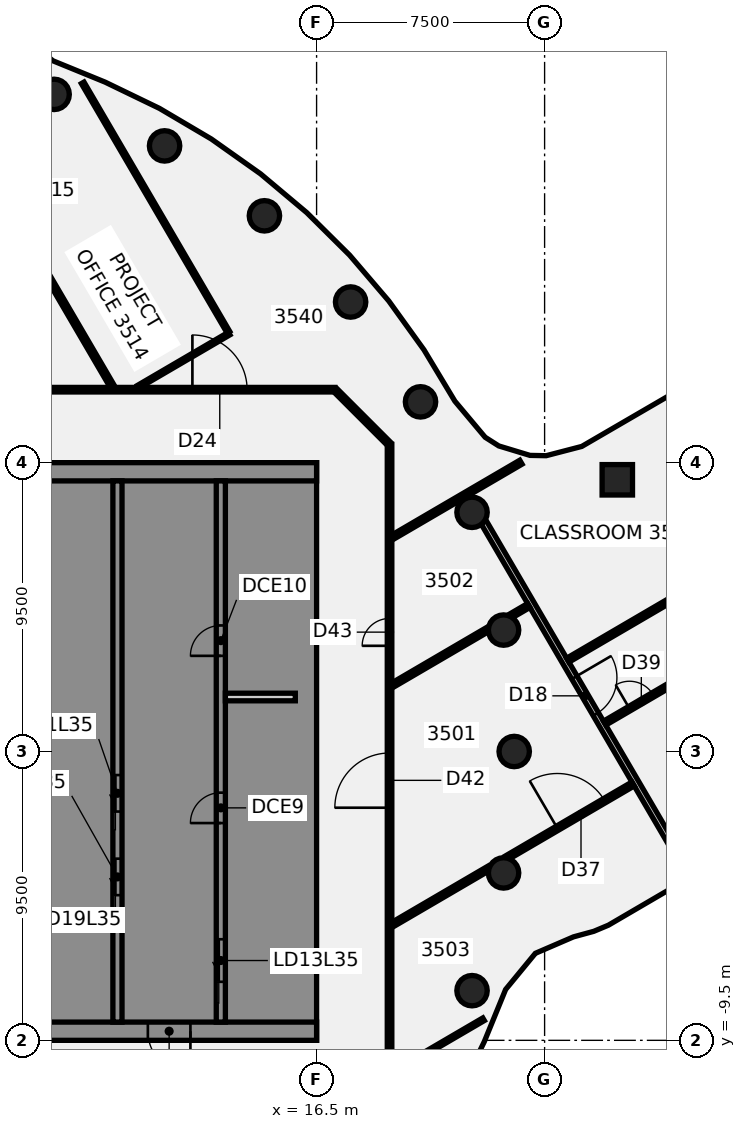
"""IFC4 building model, lengths in metres.
Left out: names, types, materials, properties, quantities, classifications, styles, units other than length and angle.
Written with IfcOpenShell. Run it as: python <this file> out.ifc"""

import sys

from ifc_helpers import new_model, si_unit, direction, frame, frame_2d, origin, origin_2d, place, context, subcontext, project, spatial, polyline, rectangle, circle, outline, extrude, element, fill, save


model = new_model("IFC4")
c1 = context("Model", 3, precision=1e-05, world=origin(), true_north=direction((0.0, 1.0)))
c2 = subcontext(c1, "Body", "Model", "MODEL_VIEW")
j1 = project(units=[si_unit("LENGTHUNIT", "METRE"), si_unit("PLANEANGLEUNIT", "RADIAN")], contexts=[c1])
p1 = place(None, origin())
s1 = spatial("IfcSite", under=j1, at=p1, CompositionType="ELEMENT")
p2 = place(p1, origin())
s2 = spatial("IfcBuilding", under=s1, at=p2, CompositionType="ELEMENT")
p3 = place(p2, frame((0.0, 0.0, 144.25)))
s3 = spatial("IfcBuildingStorey", under=s2, at=p3, CompositionType="ELEMENT", Elevation=144.25)
for number, where, z_axis, x_axis in (
    (1, (23.0, 0.0, -0.14), (0.0, 0.0, 1.0), (1.0, 0.0, 0.0)),
    (2, (22.651, 3.994, -0.14), (0.0, 0.0, 1.0), (1.0, 0.0, 0.0)),
    (3, (21.613, 7.866, -0.14), (0.0, 0.0, 1.0), (1.0, 0.0, 0.0)),
    (4, (19.919, 11.5, -0.14), (0.0, 0.0, 1.0), (1.0, 0.0, 0.0)),
    (5, (17.619, 14.784, -0.14), (0.0, 0.0, 1.0), (1.0, 0.0, 0.0)),
    (6, (14.784, 17.619, -0.14), (0.0, 0.0, 1.0), (1.0, 0.0, 0.0)),
    (7, (11.5, 19.919, -0.14), (0.0, 0.0, 1.0), (1.0, 0.0, 0.0)),
    (8, (7.866, 21.613, -0.14), (0.0, 0.0, 1.0), (1.0, 0.0, 0.0)),
    (9, (21.613, -7.866, -0.14), (0.0, 0.0, 1.0), (1.0, 0.0, 0.0)),
    (10, (22.651, -3.994, -0.14), (0.0, 0.0, 1.0), (1.0, 0.0, 0.0)),
):
    element("IfcColumn", number, at=place(p3, frame(where, z_axis=z_axis, x_axis=x_axis)), inside=s3, PredefinedType="COLUMN", context=c2, shape_type="SweptSolid", body=[
        extrude(circle(Radius=0.5, at=origin_2d()), origin(), (0.0, 0.0, 1.0), 3.75),
    ])
p4 = place(p3, frame((26.391, 8.936, -0.139), z_axis=(-0.043600009334, 0.020888959696, 0.998830661598), x_axis=(0.504374638489, -0.862555380263, 0.04005546191)))
e11 = element("IfcColumn", 11, at=p4, inside=s3, PredefinedType="COLUMN", context=c2, shape_type="SweptSolid", body=[
    extrude(rectangle(XDim=1.0, YDim=1.0, at=origin_2d()), origin(), (0.0, 0.0, 1.0), 3.752),
])
p5 = place(p3, frame((3.782, 22.267, 0.0), z_axis=(0.0, 0.0, 1.0), x_axis=(0.504584110855, -0.863362539767, 0.0)))
e12 = element("IfcWall", 12, at=p5, inside=s3, PredefinedType="PARTITIONING", context=c2, shape_type="SweptSolid", body=[
    extrude(rectangle(XDim=11.897, YDim=0.15, at=frame_2d((5.948, 0.0))), origin(), (0.0, 0.0, 1.0), 3.01),
])
p6 = place(p5, frame((3.995, 0.0, 0.0)))
e13 = element("IfcOpeningElement", 13, at=p6, cuts=e12, PredefinedType="OPENING", context=c2, shape_type="SweptSolid", body=[
    extrude(rectangle(XDim=0.9, YDim=2.1, at=frame_2d((0.45, 1.05))), frame((0.0, 0.085, 0.0), z_axis=(0.0, -1.0, 0.0), x_axis=(1.0, 0.0, 0.0)), (0.0, 0.0, 1.0), 0.17),
])
p7 = place(p3, frame((8.807, 21.993, 0.0), z_axis=(0.0, 0.0, 1.0), x_axis=(0.50451801346, -0.863401166373, 0.0)))
e14 = element("IfcWall", 14, at=p7, inside=s3, PredefinedType="PARTITIONING", context=c2, shape_type="SweptSolid", body=[
    extrude(rectangle(XDim=9.5, YDim=0.1, at=frame_2d((4.75, 0.0))), origin(), (0.0, 0.0, 1.0), 3.01),
])
p8 = place(p3, frame((21.991, 7.548, 0.0), z_axis=(0.0, 0.0, 1.0), x_axis=(0.504551750996, -0.863381451369, 0.0)))
e15 = element("IfcWall", 15, at=p8, inside=s3, PredefinedType="PARTITIONING", context=c2, shape_type="SweptSolid", body=[
    extrude(rectangle(XDim=13.22, YDim=0.2, at=frame_2d((6.61, 0.0))), origin(), (0.0, 0.0, 1.0), 3.01),
])
p9 = place(p8, frame((5.922, 0.0, 0.0)))
e16 = element("IfcOpeningElement", 16, at=p9, cuts=e15, PredefinedType="OPENING", context=c2, shape_type="SweptSolid", body=[
    extrude(rectangle(XDim=1.4, YDim=2.1, at=frame_2d((0.7, 1.05))), frame((0.0, 0.11, 0.0), z_axis=(0.0, -1.0, 0.0), x_axis=(1.0, 0.0, 0.0)), (0.0, 0.0, 1.0), 0.22),
])
p10 = place(p3, frame((17.128, 11.872, 0.0), z_axis=(0.0, 0.0, 1.0), x_axis=(0.707106781187, -0.707106781187, 0.0)))
e17 = element("IfcWall", 17, at=p10, inside=s3, PredefinedType="PARTITIONING", context=c2, shape_type="SweptSolid", body=[
    extrude(rectangle(XDim=2.465, YDim=0.15, at=frame_2d((1.232, 0.0))), origin(), (0.0, 0.0, 1.0), 3.01),
])
p11 = place(p3, frame((-17.065, 11.9, 0.0), z_axis=(0.0, 0.0, 1.0), x_axis=(1.0, 0.0, 0.0)))
e18 = element("IfcWall", 18, at=p11, inside=s3, PredefinedType="PARTITIONING", context=c2, shape_type="SweptSolid", body=[
    extrude(rectangle(XDim=34.165, YDim=0.15, at=frame_2d((17.083, 0.0))), origin(), (0.0, 0.0, 1.0), 3.01),
])
p12 = place(p11, frame((22.029, 0.0, 0.0)))
e19 = element("IfcOpeningElement", 19, at=p12, cuts=e18, PredefinedType="OPENING", context=c2, shape_type="SweptSolid", body=[
    extrude(rectangle(XDim=1.8, YDim=2.1, at=frame_2d((0.9, 1.05))), frame((0.0, 0.085, 0.0), z_axis=(0.0, -1.0, 0.0), x_axis=(1.0, 0.0, 0.0)), (0.0, 0.0, 1.0), 0.17),
])
p13 = place(p11, frame((29.48, 0.0, 0.0)))
e20 = element("IfcOpeningElement", 20, at=p13, cuts=e18, PredefinedType="OPENING", context=c2, shape_type="SweptSolid", body=[
    extrude(rectangle(XDim=1.8, YDim=2.1, at=frame_2d((0.9, 1.05))), frame((0.0, 0.085, 0.0), z_axis=(0.0, -1.0, 0.0), x_axis=(1.0, 0.0, 0.0)), (0.0, 0.0, 1.0), 0.17),
])
p14 = place(p11, frame((6.265, 0.0, 0.0)))
e21 = element("IfcOpeningElement", 21, at=p14, cuts=e18, PredefinedType="OPENING", context=c2, shape_type="SweptSolid", body=[
    extrude(rectangle(XDim=1.8, YDim=2.1, at=frame_2d((0.9, 1.05))), frame((0.0, 0.085, 0.0), z_axis=(0.0, -1.0, 0.0), x_axis=(1.0, 0.0, 0.0)), (0.0, 0.0, 1.0), 0.17),
])
p15 = place(p3, frame((10.633, 11.998, 0.0), z_axis=(0.0, 0.0, 1.0), x_axis=(0.863323711201, 0.504650542136, 0.0)))
e22 = element("IfcWall", 22, at=p15, inside=s3, PredefinedType="PARTITIONING", context=c2, shape_type="SweptSolid", body=[
    extrude(rectangle(XDim=3.465, YDim=0.1, at=frame_2d((1.733, 0.0))), origin(), (0.0, 0.0, 1.0), 3.01),
])
p16 = place(p3, frame((17.992, -11.144, 0.0), z_axis=(0.0, 0.0, 1.0), x_axis=(0.863423214725, 0.504480279371, 0.0)))
e23 = element("IfcWall", 23, at=p16, inside=s3, PredefinedType="PARTITIONING", context=c2, shape_type="SweptSolid", body=[
    extrude(rectangle(XDim=4.633, YDim=0.1, at=frame_2d((2.317, 0.0))), origin(), (0.0, 0.0, 1.0), 3.01),
])
p17 = place(p3, frame((18.995, -5.694, 0.0), z_axis=(0.0, 0.0, 1.0), x_axis=(0.863366335697, 0.504577615818, 0.0)))
e24 = element("IfcWall", 24, at=p17, inside=s3, PredefinedType="PARTITIONING", context=c2, shape_type="SweptSolid", body=[
    extrude(rectangle(XDim=3.694, YDim=0.15, at=frame_2d((1.847, 0.0))), origin(), (0.0, 0.0, 1.0), 3.01),
])
p18 = place(p3, frame((22.737, -3.507, 0.0), z_axis=(0.0, 0.0, 1.0), x_axis=(0.863390233873, 0.504536722205, 0.0)))
e25 = element("IfcWall", 25, at=p18, inside=s3, PredefinedType="PARTITIONING", context=c2, shape_type="SweptSolid", body=[
    extrude(rectangle(XDim=4.833, YDim=0.15, at=frame_2d((2.417, 0.0))), origin(), (0.0, 0.0, 1.0), 3.01),
])
p19 = place(p18, frame((1.95, 0.0, 0.0)))
e26 = element("IfcOpeningElement", 26, at=p19, cuts=e25, PredefinedType="OPENING", context=c2, shape_type="SweptSolid", body=[
    extrude(rectangle(XDim=1.8, YDim=2.1, at=frame_2d((0.9, 1.05))), frame((0.0, 0.085, 0.0), z_axis=(0.0, -1.0, 0.0), x_axis=(1.0, 0.0, 0.0)), (0.0, 0.0, 1.0), 0.17),
])
p20 = place(p3, frame((18.995, 2.181, 0.0), z_axis=(0.0, 0.0, 1.0), x_axis=(0.863310681939, 0.5046728311, 0.0)))
e27 = element("IfcWall", 27, at=p20, inside=s3, PredefinedType="PARTITIONING", context=c2, shape_type="SweptSolid", body=[
    extrude(rectangle(XDim=3.653, YDim=0.15, at=frame_2d((1.826, 0.0))), origin(), (0.0, 0.0, 1.0), 3.01),
])
p21 = place(p3, frame((22.869, 4.446, 0.0), z_axis=(0.0, 0.0, 1.0), x_axis=(0.863490976758, 0.504364286065, 0.0)))
e28 = element("IfcWall", 28, at=p21, inside=s3, PredefinedType="PARTITIONING", context=c2, shape_type="SweptSolid", body=[
    extrude(rectangle(XDim=0.708, YDim=0.15, at=frame_2d((0.354, 0.0))), origin(), (0.0, 0.0, 1.0), 3.01),
])
p22 = place(p3, frame((18.995, 7.046, 0.0), z_axis=(0.0, 0.0, 1.0), x_axis=(0.863429510598, 0.504469503765, 0.0)))
e29 = element("IfcWall", 29, at=p22, inside=s3, PredefinedType="PARTITIONING", context=c2, shape_type="SweptSolid", body=[
    extrude(rectangle(XDim=4.894, YDim=0.15, at=frame_2d((2.447, 0.0))), origin(), (0.0, 0.0, 1.0), 3.01),
])
p23 = place(p3, frame((24.762, 3.003, 0.0), z_axis=(0.0, 0.0, 1.0), x_axis=(0.863377230874, 0.504558972975, 0.0)))
e30 = element("IfcWall", 30, at=p23, inside=s3, PredefinedType="PARTITIONING", context=c2, shape_type="SweptSolid", body=[
    extrude(rectangle(XDim=13.324, YDim=0.15, at=frame_2d((6.662, 0.0))), origin(), (0.0, 0.0, 1.0), 3.01),
])
p24 = place(p23, frame((7.4, 0.0, 0.0)))
e31 = element("IfcOpeningElement", 31, at=p24, cuts=e30, PredefinedType="OPENING", context=c2, shape_type="SweptSolid", body=[
    extrude(rectangle(XDim=1.8, YDim=2.1, at=frame_2d((0.9, 1.05))), frame((0.0, 0.085, 0.0), z_axis=(0.0, -1.0, 0.0), x_axis=(1.0, 0.0, 0.0)), (0.0, 0.0, 1.0), 0.17),
])
p25 = place(p3, frame((25.977, 0.934, 0.0), z_axis=(0.0, 0.0, 1.0), x_axis=(0.863369794548, 0.504571697445, 0.0)))
e32 = element("IfcWall", 32, at=p25, inside=s3, PredefinedType="PARTITIONING", context=c2, shape_type="SweptSolid", body=[
    extrude(rectangle(XDim=3.855, YDim=0.15, at=frame_2d((1.928, 0.0))), origin(), (0.0, 0.0, 1.0), 3.01),
])
p26 = place(p25, frame((0.945, 0.0, 0.0)))
e33 = element("IfcOpeningElement", 33, at=p26, cuts=e32, PredefinedType="OPENING", context=c2, shape_type="SweptSolid", body=[
    extrude(rectangle(XDim=0.9, YDim=2.1, at=frame_2d((0.45, 1.05))), frame((0.0, 0.085, 0.0), z_axis=(0.0, -1.0, 0.0), x_axis=(1.0, 0.0, 0.0)), (0.0, 0.0, 1.0), 0.17),
])
p27 = place(p3, frame((18.9, -10.1, 0.0), z_axis=(0.0, 0.0, 1.0), x_axis=(0.0, 1.0, 0.0)))
e34 = element("IfcWall", 34, at=p27, inside=s3, PredefinedType="PARTITIONING", context=c2, shape_type="SweptSolid", body=[
    extrude(rectangle(XDim=20.2, YDim=0.15, at=frame_2d((10.1, 0.0))), origin(), (0.0, 0.0, 1.0), 3.01),
])
p28 = place(p27, frame((8.251, 0.0, 0.0)))
e35 = element("IfcOpeningElement", 35, at=p28, cuts=e34, PredefinedType="OPENING", context=c2, shape_type="SweptSolid", body=[
    extrude(rectangle(XDim=1.8, YDim=2.1, at=frame_2d((0.9, 1.05))), frame((0.0, 0.085, 0.0), z_axis=(0.0, -1.0, 0.0), x_axis=(1.0, 0.0, 0.0)), (0.0, 0.0, 1.0), 0.17),
])
p29 = place(p27, frame((13.576, 0.0, 0.0)))
e36 = element("IfcOpeningElement", 36, at=p29, cuts=e34, PredefinedType="OPENING", context=c2, shape_type="SweptSolid", body=[
    extrude(rectangle(XDim=0.9, YDim=2.1, at=frame_2d((0.45, 1.05))), frame((0.0, 0.085, 0.0), z_axis=(0.0, -1.0, 0.0), x_axis=(1.0, 0.0, 0.0)), (0.0, 0.0, 1.0), 0.17),
])
p30 = place(p3, frame((16.5, -9.2, 0.0), z_axis=(0.0, 0.0, 1.0), x_axis=(-1.0, 0.0, 0.0)))
e37 = element("IfcWall", 37, at=p30, inside=s3, PredefinedType="SHEAR", context=c2, shape_type="SweptSolid", body=[
    extrude(rectangle(XDim=13.0, YDim=0.6, at=frame_2d((6.5, 0.0))), origin(), (0.0, 0.0, 1.0), 3.61),
])
p31 = place(p30, frame((4.15, 0.0, 0.0)))
e38 = element("IfcOpeningElement", 38, at=p31, cuts=e37, PredefinedType="OPENING", context=c2, shape_type="SweptSolid", body=[
    extrude(rectangle(XDim=1.4, YDim=2.1, at=frame_2d((0.7, 1.05))), frame((0.0, 0.31, 0.0), z_axis=(0.0, -1.0, 0.0), x_axis=(1.0, 0.0, 0.0)), (0.0, 0.0, 1.0), 0.62),
])
p32 = place(p30, frame((10.125, 0.0, 0.0)))
e39 = element("IfcOpeningElement", 39, at=p32, cuts=e37, PredefinedType="OPENING", context=c2, shape_type="SweptSolid", body=[
    extrude(rectangle(XDim=1.4, YDim=2.1, at=frame_2d((0.7, 1.05))), frame((0.0, 0.31, 0.0), z_axis=(0.0, -1.0, 0.0), x_axis=(1.0, 0.0, 0.0)), (0.0, 0.0, 1.0), 0.62),
])
p33 = place(p3, origin())
e40 = element("IfcWall", 40, at=p33, inside=s3, PredefinedType="SHEAR", context=c2, shape_type="SweptSolid", body=[
    extrude(outline(polyline([(13.5, -8.125), (13.5, -8.9), (15.9, -8.9), (16.5, -8.9), (16.5, 8.9), (15.9, 8.9), (13.5, 8.9), (13.5, 8.125), (15.9, 8.125), (15.9, 5.625), (13.5, 5.625), (13.5, 5.375), (15.9, 5.375), (15.9, -5.375), (13.5, -5.375), (13.5, -5.625), (15.9, -5.625), (15.9, -8.125), (13.5, -8.125)])), origin(), (0.0, 0.0, 1.0), 3.61),
])
p34 = place(p3, frame((16.5, 9.2, 0.0), z_axis=(0.0, 0.0, 1.0), x_axis=(-1.0, 0.0, 0.0)))
e41 = element("IfcWall", 41, at=p34, inside=s3, PredefinedType="SHEAR", context=c2, shape_type="SweptSolid", body=[
    extrude(rectangle(XDim=13.0, YDim=0.6, at=frame_2d((6.5, 0.0))), origin(), (0.0, 0.0, 1.0), 3.61),
])
p35 = place(p3, origin())
e42 = element("IfcWall", 42, at=p35, inside=s3, PredefinedType="SHEAR", context=c2, shape_type="SweptSolid", body=[
    extrude(outline(polyline([(9.8, -5.375), (7.5, -5.375), (7.5, -2.875), (9.8, -2.875), (9.8, -2.625), (7.5, -2.625), (7.5, -0.125), (9.8, -0.125), (9.8, 0.125), (7.5, 0.125), (7.5, 2.625), (9.8, 2.625), (9.8, 2.875), (7.5, 2.875), (7.5, 5.375), (9.8, 5.375), (9.8, 5.625), (7.5, 5.625), (7.5, 8.125), (9.8, 8.125), (9.8, 8.9), (7.5, 8.9), (7.2, 8.9), (7.2, -5.625), (7.5, -5.625), (9.8, -5.625), (9.8, -5.375)])), origin(), (0.0, 0.0, 1.0), 3.61),
])
p36 = place(p3, origin())
e43 = element("IfcWall", 43, at=p36, inside=s3, PredefinedType="SHEAR", context=c2, shape_type="SweptSolid", body=[
    extrude(outline(polyline([(7.5, -8.125), (7.5, -8.9), (9.8, -8.9), (9.8, -8.125), (9.8, -5.625), (9.55, -5.625), (9.55, -8.125), (7.5, -8.125)])), origin(), (0.0, 0.0, 1.0), 3.61),
])
p37 = place(p3, frame((13.35, -8.9, 0.0), z_axis=(0.0, 0.0, 1.0), x_axis=(0.0, 1.0, 0.0)))
e44 = element("IfcWall", 44, at=p37, inside=s3, PredefinedType="SHEAR", context=c2, shape_type="SweptSolid", body=[
    extrude(rectangle(XDim=17.8, YDim=0.3, at=frame_2d((8.9, 0.0))), origin(), (0.0, 0.0, 1.0), 3.61),
])
p38 = place(p37, frame((1.325, 0.0, 0.0)))
e45 = element("IfcOpeningElement", 45, at=p38, cuts=e44, PredefinedType="OPENING", context=c2, shape_type="SweptSolid", body=[
    extrude(rectangle(XDim=1.4, YDim=2.1, at=frame_2d((0.7, 1.05))), frame((0.0, 0.16, 0.0), z_axis=(0.0, -1.0, 0.0), x_axis=(1.0, 0.0, 0.0)), (0.0, 0.0, 1.0), 0.32),
])
p39 = place(p37, frame((6.546, 0.0, 0.0)))
e46 = element("IfcOpeningElement", 46, at=p39, cuts=e44, PredefinedType="OPENING", context=c2, shape_type="SweptSolid", body=[
    extrude(rectangle(XDim=1.0, YDim=2.1, at=frame_2d((0.5, 1.05))), frame((0.0, 0.16, 0.0), z_axis=(0.0, -1.0, 0.0), x_axis=(1.0, 0.0, 0.0)), (0.0, 0.0, 1.0), 0.32),
])
p40 = place(p37, frame((12.046, 0.0, 0.0)))
e47 = element("IfcOpeningElement", 47, at=p40, cuts=e44, PredefinedType="OPENING", context=c2, shape_type="SweptSolid", body=[
    extrude(rectangle(XDim=1.0, YDim=2.1, at=frame_2d((0.5, 1.05))), frame((0.0, 0.16, 0.0), z_axis=(0.0, -1.0, 0.0), x_axis=(1.0, 0.0, 0.0)), (0.0, 0.0, 1.0), 0.32),
])
p41 = place(p3, frame((9.95, -8.9, 0.0), z_axis=(0.0, 0.0, 1.0), x_axis=(0.0, 1.0, 0.0)))
e48 = element("IfcWall", 48, at=p41, inside=s3, PredefinedType="SHEAR", context=c2, shape_type="SweptSolid", body=[
    extrude(rectangle(XDim=17.8, YDim=0.3, at=frame_2d((8.9, 0.0))), origin(), (0.0, 0.0, 1.0), 3.61),
])
p42 = place(p41, frame((4.175, 0.0, 0.0)))
e49 = element("IfcOpeningElement", 49, at=p42, cuts=e48, PredefinedType="OPENING", context=c2, shape_type="SweptSolid", body=[
    extrude(rectangle(XDim=1.2, YDim=2.1, at=frame_2d((0.6, 1.05))), frame((0.0, 0.16, 0.0), z_axis=(0.0, -1.0, 0.0), x_axis=(1.0, 0.0, 0.0)), (0.0, 0.0, 1.0), 0.32),
])
p43 = place(p41, frame((6.925, 0.0, 0.0)))
e50 = element("IfcOpeningElement", 50, at=p43, cuts=e48, PredefinedType="OPENING", context=c2, shape_type="SweptSolid", body=[
    extrude(rectangle(XDim=1.2, YDim=2.1, at=frame_2d((0.6, 1.05))), frame((0.0, 0.16, 0.0), z_axis=(0.0, -1.0, 0.0), x_axis=(1.0, 0.0, 0.0)), (0.0, 0.0, 1.0), 0.32),
])
p44 = place(p3, frame((15.8, 1.792, 0.0), z_axis=(0.0, 0.0, 1.0), x_axis=(-1.0, 0.0, 0.0)))
e51 = element("IfcWall", 51, at=p44, inside=s3, PredefinedType="PARTITIONING", context=c2, shape_type="SweptSolid", body=[
    extrude(rectangle(XDim=2.3, YDim=0.25, at=frame_2d((1.15, 0.0))), origin(), (0.0, 0.0, 1.0), 3.61),
])
p45 = place(p9, frame((1.4, 0.0, 0.0), z_axis=(0.0, 0.0, 1.0), x_axis=(-1.0, 0.0, 0.0)))
e52 = element("IfcDoor", 52, at=p45, inside=s3, OperationType="DOUBLE_DOOR_SINGLE_SWING", PredefinedType="DOOR", context=c2, shape_type="SweptSolid", body=[
    extrude(rectangle(XDim=1.4, YDim=2.1, at=frame_2d((0.7, 1.05))), frame((0.0, 0.025, 0.0), z_axis=(0.0, -1.0, 0.0), x_axis=(1.0, 0.0, 0.0)), (0.0, 0.0, 1.0), 0.05),
])
fill(e16, e52)
p46 = place(p13, origin())
e53 = element("IfcDoor", 53, at=p46, inside=s3, OperationType="DOUBLE_DOOR_SINGLE_SWING", PredefinedType="DOOR", context=c2, shape_type="SweptSolid", body=[
    extrude(rectangle(XDim=1.8, YDim=2.1, at=frame_2d((0.9, 1.05))), frame((0.0, 0.025, 0.0), z_axis=(0.0, -1.0, 0.0), x_axis=(1.0, 0.0, 0.0)), (0.0, 0.0, 1.0), 0.05),
])
fill(e20, e53)
p47 = place(p19, frame((1.8, 0.0, 0.0), z_axis=(0.0, 0.0, 1.0), x_axis=(-1.0, 0.0, 0.0)))
e54 = element("IfcDoor", 54, at=p47, inside=s3, OperationType="DOUBLE_DOOR_SINGLE_SWING", PredefinedType="DOOR", context=c2, shape_type="SweptSolid", body=[
    extrude(rectangle(XDim=1.8, YDim=2.1, at=frame_2d((0.9, 1.05))), frame((0.0, 0.025, 0.0), z_axis=(0.0, -1.0, 0.0), x_axis=(1.0, 0.0, 0.0)), (0.0, 0.0, 1.0), 0.05),
])
fill(e26, e54)
p48 = place(p26, frame((0.9, 0.0, 0.0), z_axis=(0.0, 0.0, 1.0), x_axis=(-1.0, 0.0, 0.0)))
e55 = element("IfcDoor", 55, at=p48, inside=s3, OperationType="SINGLE_SWING_LEFT", PredefinedType="DOOR", context=c2, shape_type="SweptSolid", body=[
    extrude(rectangle(XDim=0.9, YDim=2.1, at=frame_2d((0.45, 1.05))), frame((0.0, 0.025, 0.0), z_axis=(0.0, -1.0, 0.0), x_axis=(1.0, 0.0, 0.0)), (0.0, 0.0, 1.0), 0.05),
])
fill(e33, e55)
p49 = place(p28, origin())
e56 = element("IfcDoor", 56, at=p49, inside=s3, OperationType="DOUBLE_DOOR_SINGLE_SWING", PredefinedType="DOOR", context=c2, shape_type="SweptSolid", body=[
    extrude(rectangle(XDim=1.8, YDim=2.1, at=frame_2d((0.9, 1.05))), frame((0.0, 0.025, 0.0), z_axis=(0.0, -1.0, 0.0), x_axis=(1.0, 0.0, 0.0)), (0.0, 0.0, 1.0), 0.05),
])
fill(e35, e56)
p50 = place(p29, frame((0.9, 0.0, 0.0), z_axis=(0.0, 0.0, 1.0), x_axis=(-1.0, 0.0, 0.0)))
e57 = element("IfcDoor", 57, at=p50, inside=s3, OperationType="SINGLE_SWING_RIGHT", PredefinedType="DOOR", context=c2, shape_type="SweptSolid", body=[
    extrude(rectangle(XDim=0.9, YDim=2.1, at=frame_2d((0.45, 1.05))), frame((0.0, 0.025, 0.0), z_axis=(0.0, -1.0, 0.0), x_axis=(1.0, 0.0, 0.0)), (0.0, 0.0, 1.0), 0.05),
])
fill(e36, e57)
p51 = place(p31, origin())
e58 = element("IfcDoor", 58, at=p51, inside=s3, OperationType="SINGLE_SWING_LEFT", PredefinedType="DOOR", context=c2, shape_type="SweptSolid", body=[
    extrude(rectangle(XDim=1.4, YDim=2.1, at=frame_2d((0.7, 1.05))), frame((0.0, 0.025, 0.0), z_axis=(0.0, -1.0, 0.0), x_axis=(1.0, 0.0, 0.0)), (0.0, 0.0, 1.0), 0.05),
])
fill(e38, e58)
p52 = place(p38, origin())
e59 = element("IfcDoor", 59, at=p52, inside=s3, OperationType="SLIDING_TO_LEFT", PredefinedType="DOOR", context=c2, shape_type="SweptSolid", body=[
    extrude(rectangle(XDim=1.4, YDim=2.1, at=frame_2d((0.7, 1.05))), frame((0.0, 0.025, 0.0), z_axis=(0.0, -1.0, 0.0), x_axis=(1.0, 0.0, 0.0)), (0.0, 0.0, 1.0), 0.05),
])
fill(e45, e59)
p53 = place(p42, origin())
e60 = element("IfcDoor", 60, at=p53, inside=s3, OperationType="SLIDING_TO_LEFT", PredefinedType="DOOR", context=c2, shape_type="SweptSolid", body=[
    extrude(rectangle(XDim=1.2, YDim=2.1, at=frame_2d((0.6, 1.05))), frame((0.0, 0.025, 0.0), z_axis=(0.0, -1.0, 0.0), x_axis=(1.0, 0.0, 0.0)), (0.0, 0.0, 1.0), 0.05),
])
fill(e49, e60)
p54 = place(p43, origin())
e61 = element("IfcDoor", 61, at=p54, inside=s3, OperationType="SLIDING_TO_LEFT", PredefinedType="DOOR", context=c2, shape_type="SweptSolid", body=[
    extrude(rectangle(XDim=1.2, YDim=2.1, at=frame_2d((0.6, 1.05))), frame((0.0, 0.025, 0.0), z_axis=(0.0, -1.0, 0.0), x_axis=(1.0, 0.0, 0.0)), (0.0, 0.0, 1.0), 0.05),
])
fill(e50, e61)
p55 = place(p39, origin())
e62 = element("IfcDoor", 62, at=p55, inside=s3, OperationType="SINGLE_SWING_LEFT", PredefinedType="DOOR", context=c2, shape_type="SweptSolid", body=[
    extrude(rectangle(XDim=1.0, YDim=2.1, at=frame_2d((0.5, 1.05))), frame((0.0, 0.025, 0.0), z_axis=(0.0, -1.0, 0.0), x_axis=(1.0, 0.0, 0.0)), (0.0, 0.0, 1.0), 0.05),
])
fill(e46, e62)
p56 = place(p40, origin())
e63 = element("IfcDoor", 63, at=p56, inside=s3, OperationType="SINGLE_SWING_LEFT", PredefinedType="DOOR", context=c2, shape_type="SweptSolid", body=[
    extrude(rectangle(XDim=1.0, YDim=2.1, at=frame_2d((0.5, 1.05))), frame((0.0, 0.025, 0.0), z_axis=(0.0, -1.0, 0.0), x_axis=(1.0, 0.0, 0.0)), (0.0, 0.0, 1.0), 0.05),
])
fill(e47, e63)
save(model, sys.argv[1])
